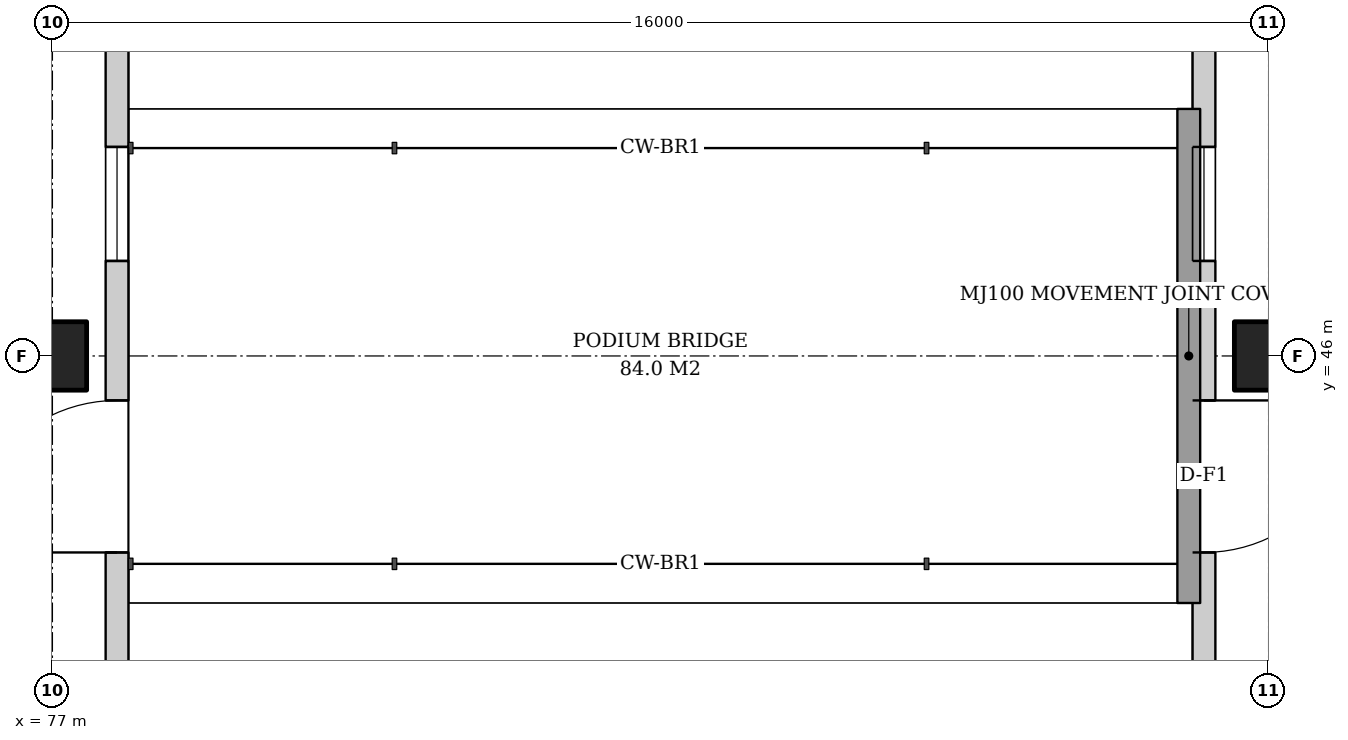
"""IFC4 building model, lengths in metres.
Left out: names, types, materials, properties, quantities, classifications, styles, units other than length and angle.
Written with IfcOpenShell. Run it as: python <this file> out.ifc"""

import sys

from ifc_helpers import new_model, si_unit, direction, frame, frame_2d, origin, origin_2d, place, context, subcontext, project, spatial, rectangle, extrude, element, fill, save


model = new_model("IFC4")
c1 = context("Model", 3, precision=1e-05, world=origin(), true_north=direction((0.0, 1.0)))
c2 = subcontext(c1, "Body", "Model", "MODEL_VIEW")
j1 = project(units=[si_unit("LENGTHUNIT", "METRE"), si_unit("PLANEANGLEUNIT", "RADIAN")], contexts=[c1])
p1 = place(None, origin())
s1 = spatial("IfcSite", under=j1, at=p1, CompositionType="ELEMENT")
p2 = place(p1, origin())
s2 = spatial("IfcBuilding", under=s1, at=p2, CompositionType="ELEMENT")
p3 = place(p2, frame((0.0, 0.0, 11.0)))
s3 = spatial("IfcBuildingStorey", under=s2, at=p3, CompositionType="ELEMENT", Elevation=11.0)
for number, where, z_axis, x_axis in (
    (1, (77.0, 46.0, 0.0), (0.0, 0.0, 1.0), (1.0, 0.0, 0.0)),
    (2, (93.0, 46.0, 0.0), (0.0, 0.0, 1.0), (1.0, 0.0, 0.0)),
):
    element("IfcColumn", number, at=place(p3, frame(where, z_axis=z_axis, x_axis=x_axis)), inside=s3, PredefinedType="COLUMN", context=c2, shape_type="SweptSolid", body=[
        extrude(rectangle(XDim=0.9, YDim=0.9, at=origin_2d()), origin(), (0.0, 0.0, 1.0), 5.0),
    ])
p4 = place(p3, frame((77.85, 21.3, 0.0), z_axis=(0.0, 0.0, 1.0), x_axis=(0.0, 1.0, 0.0)))
e3 = element("IfcWall", 3, at=p4, inside=s3, PredefinedType="SOLIDWALL", context=c2, shape_type="SweptSolid", body=[
    extrude(rectangle(XDim=57.4, YDim=0.3, at=frame_2d((28.7, 0.0))), origin(), (0.0, 0.0, 1.0), 4.7),
])
p5 = place(p4, frame((1.2, 0.0, 0.9)))
e4 = element("IfcOpeningElement", 4, at=p5, cuts=e3, PredefinedType="OPENING", context=c2, shape_type="SweptSolid", body=[
    extrude(rectangle(XDim=1.5, YDim=3.2, at=frame_2d((0.75, 1.6))), frame((0.0, 0.16, 0.0), z_axis=(0.0, -1.0, 0.0), x_axis=(1.0, 0.0, 0.0)), (0.0, 0.0, 1.0), 0.32),
])
p6 = place(p4, frame((5.7, 0.0, 0.9)))
e5 = element("IfcOpeningElement", 5, at=p6, cuts=e3, PredefinedType="OPENING", context=c2, shape_type="SweptSolid", body=[
    extrude(rectangle(XDim=1.5, YDim=3.2, at=frame_2d((0.75, 1.6))), frame((0.0, 0.16, 0.0), z_axis=(0.0, -1.0, 0.0), x_axis=(1.0, 0.0, 0.0)), (0.0, 0.0, 1.0), 0.32),
])
p7 = place(p4, frame((9.95, 0.0, 0.9)))
e6 = element("IfcOpeningElement", 6, at=p7, cuts=e3, PredefinedType="OPENING", context=c2, shape_type="SweptSolid", body=[
    extrude(rectangle(XDim=1.5, YDim=3.2, at=frame_2d((0.75, 1.6))), frame((0.0, 0.16, 0.0), z_axis=(0.0, -1.0, 0.0), x_axis=(1.0, 0.0, 0.0)), (0.0, 0.0, 1.0), 0.32),
])
p8 = place(p4, frame((13.95, 0.0, 0.9)))
e7 = element("IfcOpeningElement", 7, at=p8, cuts=e3, PredefinedType="OPENING", context=c2, shape_type="SweptSolid", body=[
    extrude(rectangle(XDim=1.5, YDim=3.2, at=frame_2d((0.75, 1.6))), frame((0.0, 0.16, 0.0), z_axis=(0.0, -1.0, 0.0), x_axis=(1.0, 0.0, 0.0)), (0.0, 0.0, 1.0), 0.32),
])
p9 = place(p4, frame((25.95, 0.0, 0.9)))
e8 = element("IfcOpeningElement", 8, at=p9, cuts=e3, PredefinedType="OPENING", context=c2, shape_type="SweptSolid", body=[
    extrude(rectangle(XDim=1.5, YDim=3.2, at=frame_2d((0.75, 1.6))), frame((0.0, 0.16, 0.0), z_axis=(0.0, -1.0, 0.0), x_axis=(1.0, 0.0, 0.0)), (0.0, 0.0, 1.0), 0.32),
])
p10 = place(p4, frame((29.95, 0.0, 0.9)))
e9 = element("IfcOpeningElement", 9, at=p10, cuts=e3, PredefinedType="OPENING", context=c2, shape_type="SweptSolid", body=[
    extrude(rectangle(XDim=1.5, YDim=3.2, at=frame_2d((0.75, 1.6))), frame((0.0, 0.16, 0.0), z_axis=(0.0, -1.0, 0.0), x_axis=(1.0, 0.0, 0.0)), (0.0, 0.0, 1.0), 0.32),
])
p11 = place(p4, frame((33.95, 0.0, 0.9)))
e10 = element("IfcOpeningElement", 10, at=p11, cuts=e3, PredefinedType="OPENING", context=c2, shape_type="SweptSolid", body=[
    extrude(rectangle(XDim=1.5, YDim=3.2, at=frame_2d((0.75, 1.6))), frame((0.0, 0.16, 0.0), z_axis=(0.0, -1.0, 0.0), x_axis=(1.0, 0.0, 0.0)), (0.0, 0.0, 1.0), 0.32),
])
p12 = place(p4, frame((37.95, 0.0, 0.9)))
e11 = element("IfcOpeningElement", 11, at=p12, cuts=e3, PredefinedType="OPENING", context=c2, shape_type="SweptSolid", body=[
    extrude(rectangle(XDim=1.5, YDim=3.2, at=frame_2d((0.75, 1.6))), frame((0.0, 0.16, 0.0), z_axis=(0.0, -1.0, 0.0), x_axis=(1.0, 0.0, 0.0)), (0.0, 0.0, 1.0), 0.32),
])
p13 = place(p4, frame((41.95, 0.0, 0.9)))
e12 = element("IfcOpeningElement", 12, at=p13, cuts=e3, PredefinedType="OPENING", context=c2, shape_type="SweptSolid", body=[
    extrude(rectangle(XDim=1.5, YDim=3.2, at=frame_2d((0.75, 1.6))), frame((0.0, 0.16, 0.0), z_axis=(0.0, -1.0, 0.0), x_axis=(1.0, 0.0, 0.0)), (0.0, 0.0, 1.0), 0.32),
])
p14 = place(p4, frame((45.95, 0.0, 0.9)))
e13 = element("IfcOpeningElement", 13, at=p14, cuts=e3, PredefinedType="OPENING", context=c2, shape_type="SweptSolid", body=[
    extrude(rectangle(XDim=1.5, YDim=3.2, at=frame_2d((0.75, 1.6))), frame((0.0, 0.16, 0.0), z_axis=(0.0, -1.0, 0.0), x_axis=(1.0, 0.0, 0.0)), (0.0, 0.0, 1.0), 0.32),
])
p15 = place(p4, frame((50.2, 0.0, 0.9)))
e14 = element("IfcOpeningElement", 14, at=p15, cuts=e3, PredefinedType="OPENING", context=c2, shape_type="SweptSolid", body=[
    extrude(rectangle(XDim=1.5, YDim=3.2, at=frame_2d((0.75, 1.6))), frame((0.0, 0.16, 0.0), z_axis=(0.0, -1.0, 0.0), x_axis=(1.0, 0.0, 0.0)), (0.0, 0.0, 1.0), 0.32),
])
p16 = place(p4, frame((54.7, 0.0, 0.9)))
e15 = element("IfcOpeningElement", 15, at=p16, cuts=e3, PredefinedType="OPENING", context=c2, shape_type="SweptSolid", body=[
    extrude(rectangle(XDim=1.5, YDim=3.2, at=frame_2d((0.75, 1.6))), frame((0.0, 0.16, 0.0), z_axis=(0.0, -1.0, 0.0), x_axis=(1.0, 0.0, 0.0)), (0.0, 0.0, 1.0), 0.32),
])
p17 = place(p4, frame((22.115, 0.0, 0.0)))
e16 = element("IfcOpeningElement", 16, at=p17, cuts=e3, PredefinedType="OPENING", context=c2, shape_type="SweptSolid", body=[
    extrude(rectangle(XDim=2.0, YDim=2.4, at=frame_2d((1.0, 1.2))), frame((0.0, 0.16, 0.0), z_axis=(0.0, -1.0, 0.0), x_axis=(1.0, 0.0, 0.0)), (0.0, 0.0, 1.0), 0.32),
])
p18 = place(p3, frame((92.15, 78.7, 0.0), z_axis=(0.0, 0.0, 1.0), x_axis=(0.0, -1.0, 0.0)))
e17 = element("IfcWall", 17, at=p18, inside=s3, PredefinedType="SOLIDWALL", context=c2, shape_type="SweptSolid", body=[
    extrude(rectangle(XDim=57.4, YDim=0.3, at=frame_2d((28.7, 0.0))), origin(), (0.0, 0.0, 1.0), 4.7),
])
p19 = place(p18, frame((1.2, 0.0, 0.9)))
e18 = element("IfcOpeningElement", 18, at=p19, cuts=e17, PredefinedType="OPENING", context=c2, shape_type="SweptSolid", body=[
    extrude(rectangle(XDim=1.5, YDim=3.2, at=frame_2d((0.75, 1.6))), frame((0.0, 0.16, 0.0), z_axis=(0.0, -1.0, 0.0), x_axis=(1.0, 0.0, 0.0)), (0.0, 0.0, 1.0), 0.32),
])
p20 = place(p18, frame((5.7, 0.0, 0.9)))
e19 = element("IfcOpeningElement", 19, at=p20, cuts=e17, PredefinedType="OPENING", context=c2, shape_type="SweptSolid", body=[
    extrude(rectangle(XDim=1.5, YDim=3.2, at=frame_2d((0.75, 1.6))), frame((0.0, 0.16, 0.0), z_axis=(0.0, -1.0, 0.0), x_axis=(1.0, 0.0, 0.0)), (0.0, 0.0, 1.0), 0.32),
])
p21 = place(p18, frame((9.95, 0.0, 0.9)))
e20 = element("IfcOpeningElement", 20, at=p21, cuts=e17, PredefinedType="OPENING", context=c2, shape_type="SweptSolid", body=[
    extrude(rectangle(XDim=1.5, YDim=3.2, at=frame_2d((0.75, 1.6))), frame((0.0, 0.16, 0.0), z_axis=(0.0, -1.0, 0.0), x_axis=(1.0, 0.0, 0.0)), (0.0, 0.0, 1.0), 0.32),
])
p22 = place(p18, frame((13.95, 0.0, 0.9)))
e21 = element("IfcOpeningElement", 21, at=p22, cuts=e17, PredefinedType="OPENING", context=c2, shape_type="SweptSolid", body=[
    extrude(rectangle(XDim=1.5, YDim=3.2, at=frame_2d((0.75, 1.6))), frame((0.0, 0.16, 0.0), z_axis=(0.0, -1.0, 0.0), x_axis=(1.0, 0.0, 0.0)), (0.0, 0.0, 1.0), 0.32),
])
p23 = place(p18, frame((17.95, 0.0, 0.9)))
e22 = element("IfcOpeningElement", 22, at=p23, cuts=e17, PredefinedType="OPENING", context=c2, shape_type="SweptSolid", body=[
    extrude(rectangle(XDim=1.5, YDim=3.2, at=frame_2d((0.75, 1.6))), frame((0.0, 0.16, 0.0), z_axis=(0.0, -1.0, 0.0), x_axis=(1.0, 0.0, 0.0)), (0.0, 0.0, 1.0), 0.32),
])
p24 = place(p18, frame((21.95, 0.0, 0.9)))
e23 = element("IfcOpeningElement", 23, at=p24, cuts=e17, PredefinedType="OPENING", context=c2, shape_type="SweptSolid", body=[
    extrude(rectangle(XDim=1.5, YDim=3.2, at=frame_2d((0.75, 1.6))), frame((0.0, 0.16, 0.0), z_axis=(0.0, -1.0, 0.0), x_axis=(1.0, 0.0, 0.0)), (0.0, 0.0, 1.0), 0.32),
])
p25 = place(p18, frame((25.95, 0.0, 0.9)))
e24 = element("IfcOpeningElement", 24, at=p25, cuts=e17, PredefinedType="OPENING", context=c2, shape_type="SweptSolid", body=[
    extrude(rectangle(XDim=1.5, YDim=3.2, at=frame_2d((0.75, 1.6))), frame((0.0, 0.16, 0.0), z_axis=(0.0, -1.0, 0.0), x_axis=(1.0, 0.0, 0.0)), (0.0, 0.0, 1.0), 0.32),
])
p26 = place(p18, frame((29.95, 0.0, 0.9)))
e25 = element("IfcOpeningElement", 25, at=p26, cuts=e17, PredefinedType="OPENING", context=c2, shape_type="SweptSolid", body=[
    extrude(rectangle(XDim=1.5, YDim=3.2, at=frame_2d((0.75, 1.6))), frame((0.0, 0.16, 0.0), z_axis=(0.0, -1.0, 0.0), x_axis=(1.0, 0.0, 0.0)), (0.0, 0.0, 1.0), 0.32),
])
p27 = place(p18, frame((41.95, 0.0, 0.9)))
e26 = element("IfcOpeningElement", 26, at=p27, cuts=e17, PredefinedType="OPENING", context=c2, shape_type="SweptSolid", body=[
    extrude(rectangle(XDim=1.5, YDim=3.2, at=frame_2d((0.75, 1.6))), frame((0.0, 0.16, 0.0), z_axis=(0.0, -1.0, 0.0), x_axis=(1.0, 0.0, 0.0)), (0.0, 0.0, 1.0), 0.32),
])
p28 = place(p18, frame((45.95, 0.0, 0.9)))
e27 = element("IfcOpeningElement", 27, at=p28, cuts=e17, PredefinedType="OPENING", context=c2, shape_type="SweptSolid", body=[
    extrude(rectangle(XDim=1.5, YDim=3.2, at=frame_2d((0.75, 1.6))), frame((0.0, 0.16, 0.0), z_axis=(0.0, -1.0, 0.0), x_axis=(1.0, 0.0, 0.0)), (0.0, 0.0, 1.0), 0.32),
])
p29 = place(p18, frame((50.2, 0.0, 0.9)))
e28 = element("IfcOpeningElement", 28, at=p29, cuts=e17, PredefinedType="OPENING", context=c2, shape_type="SweptSolid", body=[
    extrude(rectangle(XDim=1.5, YDim=3.2, at=frame_2d((0.75, 1.6))), frame((0.0, 0.16, 0.0), z_axis=(0.0, -1.0, 0.0), x_axis=(1.0, 0.0, 0.0)), (0.0, 0.0, 1.0), 0.32),
])
p30 = place(p18, frame((54.7, 0.0, 0.9)))
e29 = element("IfcOpeningElement", 29, at=p30, cuts=e17, PredefinedType="OPENING", context=c2, shape_type="SweptSolid", body=[
    extrude(rectangle(XDim=1.5, YDim=3.2, at=frame_2d((0.75, 1.6))), frame((0.0, 0.16, 0.0), z_axis=(0.0, -1.0, 0.0), x_axis=(1.0, 0.0, 0.0)), (0.0, 0.0, 1.0), 0.32),
])
p31 = place(p18, frame((33.285, 0.0, 0.0)))
e30 = element("IfcOpeningElement", 30, at=p31, cuts=e17, PredefinedType="OPENING", context=c2, shape_type="SweptSolid", body=[
    extrude(rectangle(XDim=2.0, YDim=2.4, at=frame_2d((1.0, 1.2))), frame((0.0, 0.16, 0.0), z_axis=(0.0, -1.0, 0.0), x_axis=(1.0, 0.0, 0.0)), (0.0, 0.0, 1.0), 0.32),
])
p32 = place(p9, origin())
e31 = element("IfcWindow", 31, at=p32, inside=s3, PartitioningType="SINGLE_PANEL", PredefinedType="WINDOW", context=c2, shape_type="SweptSolid", body=[
    extrude(rectangle(XDim=1.5, YDim=3.2, at=frame_2d((0.75, 1.6))), frame((0.0, 0.03, 0.0), z_axis=(0.0, -1.0, 0.0), x_axis=(1.0, 0.0, 0.0)), (0.0, 0.0, 1.0), 0.06),
])
fill(e8, e31)
p33 = place(p17, origin())
e32 = element("IfcDoor", 32, at=p33, inside=s3, OperationType="DOUBLE_DOOR_SINGLE_SWING", PredefinedType="DOOR", context=c2, shape_type="SweptSolid", body=[
    extrude(rectangle(XDim=2.0, YDim=2.4, at=frame_2d((1.0, 1.2))), frame((0.0, 0.025, 0.0), z_axis=(0.0, -1.0, 0.0), x_axis=(1.0, 0.0, 0.0)), (0.0, 0.0, 1.0), 0.05),
])
fill(e16, e32)
p34 = place(p26, origin())
e33 = element("IfcWindow", 33, at=p34, inside=s3, PartitioningType="SINGLE_PANEL", PredefinedType="WINDOW", context=c2, shape_type="SweptSolid", body=[
    extrude(rectangle(XDim=1.5, YDim=3.2, at=frame_2d((0.75, 1.6))), frame((0.0, 0.03, 0.0), z_axis=(0.0, -1.0, 0.0), x_axis=(1.0, 0.0, 0.0)), (0.0, 0.0, 1.0), 0.06),
])
fill(e25, e33)
p35 = place(p31, origin())
e34 = element("IfcDoor", 34, at=p35, inside=s3, OperationType="DOUBLE_DOOR_SINGLE_SWING", PredefinedType="DOOR", context=c2, shape_type="SweptSolid", body=[
    extrude(rectangle(XDim=2.0, YDim=2.4, at=frame_2d((1.0, 1.2))), frame((0.0, 0.025, 0.0), z_axis=(0.0, -1.0, 0.0), x_axis=(1.0, 0.0, 0.0)), (0.0, 0.0, 1.0), 0.05),
])
fill(e30, e34)
save(model, sys.argv[1])
